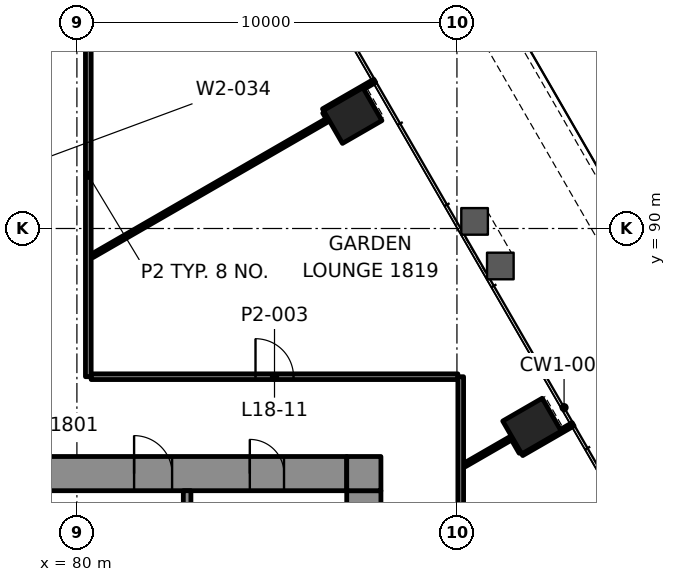
"""IFC4 building model, lengths in metres.
Left out: names, types, materials, properties, quantities, classifications, styles, units other than length and angle.
Written with IfcOpenShell. Run it as: python <this file> out.ifc"""

import sys

from ifc_helpers import new_model, si_unit, direction, frame, frame_2d, origin, origin_2d, place, context, subcontext, project, spatial, rectangle, extrude, element, fill, save


model = new_model("IFC4")
c1 = context("Model", 3, precision=1e-05, world=origin(), true_north=direction((0.0, 1.0)))
c2 = subcontext(c1, "Body", "Model", "MODEL_VIEW")
j1 = project(units=[si_unit("LENGTHUNIT", "METRE"), si_unit("PLANEANGLEUNIT", "RADIAN")], contexts=[c1])
p1 = place(None, origin())
s1 = spatial("IfcSite", under=j1, at=p1, CompositionType="ELEMENT")
p2 = place(p1, origin())
s2 = spatial("IfcBuilding", under=s1, at=p2, CompositionType="ELEMENT")
p3 = place(p2, frame((0.0, 0.0, 82.0)))
s3 = spatial("IfcBuildingStorey", under=s2, at=p3, CompositionType="ELEMENT", Elevation=82.0)
for number, where, z_axis, x_axis in (
    (1, (91.975, 84.8, -0.0), (0.0, 0.0, 1.0), (-0.5, 0.866, 0.0)),
    (2, (87.257, 92.972, -0.0), (0.0, 0.0, 1.0), (-0.5, 0.866, 0.0)),
):
    element("IfcColumn", number, at=place(p3, frame(where, z_axis=z_axis, x_axis=x_axis)), inside=s3, PredefinedType="COLUMN", context=c2, shape_type="SweptSolid", body=[
        extrude(rectangle(XDim=1.0, YDim=1.2, at=origin_2d()), origin(), (0.0, 0.0, 1.0), 4.2),
    ])
p4 = place(p3, frame((62.0, 83.55, 0.0), z_axis=(0.0, 0.0, 1.0), x_axis=(1.0, 0.0, 0.0)))
e3 = element("IfcWall", 3, at=p4, inside=s3, PredefinedType="SHEAR", context=c2, shape_type="SweptSolid", body=[
    extrude(rectangle(XDim=25.1, YDim=0.9, at=frame_2d((12.55, 0.0))), origin(), (0.0, 0.0, 1.0), 4.0),
])
p5 = place(p4, frame((5.695, 0.0, 0.0)))
e4 = element("IfcOpeningElement", 4, at=p5, cuts=e3, PredefinedType="OPENING", context=c2, shape_type="SweptSolid", body=[
    extrude(rectangle(XDim=1.0, YDim=2.1, at=frame_2d((0.5, 1.05))), frame((0.0, 0.46, 0.0), z_axis=(0.0, -1.0, 0.0), x_axis=(1.0, 0.0, 0.0)), (0.0, 0.0, 1.0), 0.92),
])
p6 = place(p4, frame((19.505, 0.0, 0.0)))
e5 = element("IfcOpeningElement", 5, at=p6, cuts=e3, PredefinedType="OPENING", context=c2, shape_type="SweptSolid", body=[
    extrude(rectangle(XDim=1.0, YDim=2.1, at=frame_2d((0.5, 1.05))), frame((0.0, 0.46, 0.0), z_axis=(0.0, -1.0, 0.0), x_axis=(1.0, 0.0, 0.0)), (0.0, 0.0, 1.0), 0.92),
])
p7 = place(p4, frame((3.45, 0.0, 0.0)))
e6 = element("IfcOpeningElement", 6, at=p7, cuts=e3, PredefinedType="OPENING", context=c2, shape_type="SweptSolid", body=[
    extrude(rectangle(XDim=0.9, YDim=2.1, at=frame_2d((0.45, 1.05))), frame((0.0, 0.46, 0.0), z_axis=(0.0, -1.0, 0.0), x_axis=(1.0, 0.0, 0.0)), (0.0, 0.0, 1.0), 0.92),
])
p8 = place(p4, frame((12.65, 0.0, 0.0)))
e7 = element("IfcOpeningElement", 7, at=p8, cuts=e3, PredefinedType="OPENING", context=c2, shape_type="SweptSolid", body=[
    extrude(rectangle(XDim=0.9, YDim=2.1, at=frame_2d((0.45, 1.05))), frame((0.0, 0.46, 0.0), z_axis=(0.0, -1.0, 0.0), x_axis=(1.0, 0.0, 0.0)), (0.0, 0.0, 1.0), 0.92),
])
p9 = place(p4, frame((22.55, 0.0, 0.0)))
e8 = element("IfcOpeningElement", 8, at=p9, cuts=e3, PredefinedType="OPENING", context=c2, shape_type="SweptSolid", body=[
    extrude(rectangle(XDim=0.9, YDim=2.1, at=frame_2d((0.45, 1.05))), frame((0.0, 0.46, 0.0), z_axis=(0.0, -1.0, 0.0), x_axis=(1.0, 0.0, 0.0)), (0.0, 0.0, 1.0), 0.92),
])
p10 = place(p3, frame((87.55, 66.9, 0.0), z_axis=(0.0, 0.0, 1.0), x_axis=(0.0, 1.0, 0.0)))
e9 = element("IfcWall", 9, at=p10, inside=s3, PredefinedType="SHEAR", context=c2, shape_type="SweptSolid", body=[
    extrude(rectangle(XDim=16.2, YDim=0.9, at=frame_2d((8.1, 0.0))), origin(), (0.0, 0.0, 1.0), 4.0),
])
p11 = place(p10, frame((5.5, 0.0, 0.0)))
e10 = element("IfcOpeningElement", 10, at=p11, cuts=e9, PredefinedType="OPENING", context=c2, shape_type="SweptSolid", body=[
    extrude(rectangle(XDim=1.8, YDim=2.1, at=frame_2d((0.9, 1.05))), frame((0.0, 0.46, 0.0), z_axis=(0.0, -1.0, 0.0), x_axis=(1.0, 0.0, 0.0)), (0.0, 0.0, 1.0), 0.92),
])
p12 = place(p10, frame((11.738, 0.0, 0.0)))
e11 = element("IfcOpeningElement", 11, at=p12, cuts=e9, PredefinedType="OPENING", context=c2, shape_type="SweptSolid", body=[
    extrude(rectangle(XDim=0.9, YDim=2.1, at=frame_2d((0.45, 1.05))), frame((0.0, 0.46, 0.0), z_axis=(0.0, -1.0, 0.0), x_axis=(1.0, 0.0, 0.0)), (0.0, 0.0, 1.0), 0.92),
])
p13 = place(p3, frame((87.1, 83.55, 0.0), z_axis=(0.0, 0.0, 1.0), x_axis=(1.0, 0.0, 0.0)))
e12 = element("IfcWall", 12, at=p13, inside=s3, PredefinedType="SHEAR", context=c2, shape_type="SweptSolid", body=[
    extrude(rectangle(XDim=0.9, YDim=0.9, at=frame_2d((0.45, 0.0))), origin(), (0.0, 0.0, 1.0), 4.0),
])
p14 = place(p3, frame((80.375, 86.1, 0.0), z_axis=(0.0, 0.0, 1.0), x_axis=(1.0, 0.0, 0.0)))
e13 = element("IfcWall", 13, at=p14, inside=s3, PredefinedType="PARTITIONING", context=c2, shape_type="SweptSolid", body=[
    extrude(rectangle(XDim=9.649, YDim=0.15, at=frame_2d((4.825, 0.0))), origin(), (0.0, 0.0, 1.0), 3.4),
])
p15 = place(p14, frame((4.325, 0.0, 0.0)))
e14 = element("IfcOpeningElement", 14, at=p15, cuts=e13, PredefinedType="OPENING", context=c2, shape_type="SweptSolid", body=[
    extrude(rectangle(XDim=1.0, YDim=2.1, at=frame_2d((0.5, 1.05))), frame((0.0, 0.085, 0.0), z_axis=(0.0, -1.0, 0.0), x_axis=(1.0, 0.0, 0.0)), (0.0, 0.0, 1.0), 0.17),
])
p16 = place(p3, frame((91.706, 84.068, 0.0), z_axis=(0.0, 0.0, 1.0), x_axis=(0.866018739521, 0.500011542666, 0.0)))
e15 = element("IfcWall", 15, at=p16, inside=s3, PredefinedType="PARTITIONING", context=c2, shape_type="SweptSolid", body=[
    extrude(rectangle(XDim=1.56, YDim=0.1, at=frame_2d((0.78, 0.0))), origin(), (0.0, 0.0, 1.0), 3.165),
])
p17 = place(p3, frame((90.201, 83.776, 0.0), z_axis=(0.0, 0.0, 1.0), x_axis=(0.866003030001, 0.500038750527, 0.0)))
e16 = element("IfcWall", 16, at=p17, inside=s3, PredefinedType="PARTITIONING", context=c2, shape_type="SweptSolid", body=[
    extrude(rectangle(XDim=1.448, YDim=0.1, at=frame_2d((0.724, 0.0))), origin(), (0.0, 0.0, 1.0), 3.4),
])
p18 = place(p3, frame((80.401, 89.28, 0.0), z_axis=(0.0, 0.0, 1.0), x_axis=(0.866017489163, 0.500013708276, 0.0)))
e17 = element("IfcWall", 17, at=p18, inside=s3, PredefinedType="PARTITIONING", context=c2, shape_type="SweptSolid", body=[
    extrude(rectangle(XDim=7.183, YDim=0.1, at=frame_2d((3.592, 0.0))), origin(), (0.0, 0.0, 1.0), 3.4),
])
p19 = place(p3, frame((86.488, 93.105, 0.0), z_axis=(0.0, 0.0, 1.0), x_axis=(0.866018739521, 0.500011542666, 0.0)))
e18 = element("IfcWall", 18, at=p19, inside=s3, PredefinedType="PARTITIONING", context=c2, shape_type="SweptSolid", body=[
    extrude(rectangle(XDim=1.56, YDim=0.1, at=frame_2d((0.78, 0.0))), origin(), (0.0, 0.0, 1.0), 3.165),
])
p20 = place(p3, frame((90.1, 86.1, 0.0), z_axis=(0.0, 0.0, 1.0), x_axis=(0.0, -1.0, 0.0)))
e19 = element("IfcWall", 19, at=p20, inside=s3, PredefinedType="PARTITIONING", context=c2, shape_type="SweptSolid", body=[
    extrude(rectangle(XDim=18.778, YDim=0.15, at=frame_2d((9.389, 0.0))), origin(), (0.0, 0.0, 1.0), 3.4),
])
p21 = place(p20, frame((7.462, 0.0, 0.0)))
e20 = element("IfcOpeningElement", 20, at=p21, cuts=e19, PredefinedType="OPENING", context=c2, shape_type="SweptSolid", body=[
    extrude(rectangle(XDim=1.0, YDim=2.1, at=frame_2d((0.5, 1.05))), frame((0.0, 0.085, 0.0), z_axis=(0.0, -1.0, 0.0), x_axis=(1.0, 0.0, 0.0)), (0.0, 0.0, 1.0), 0.17),
])
p22 = place(p20, frame((15.559, 0.0, 0.0)))
e21 = element("IfcOpeningElement", 21, at=p22, cuts=e19, PredefinedType="OPENING", context=c2, shape_type="SweptSolid", body=[
    extrude(rectangle(XDim=1.0, YDim=2.1, at=frame_2d((0.5, 1.05))), frame((0.0, 0.085, 0.0), z_axis=(0.0, -1.0, 0.0), x_axis=(1.0, 0.0, 0.0)), (0.0, 0.0, 1.0), 0.17),
])
p23 = place(p3, frame((80.3, 86.1, 0.0), z_axis=(0.0, 0.0, 1.0), x_axis=(0.0, 1.0, 0.0)))
e22 = element("IfcWall", 22, at=p23, inside=s3, PredefinedType="PARTITIONING", context=c2, shape_type="SweptSolid", body=[
    extrude(rectangle(XDim=10.599, YDim=0.15, at=frame_2d((5.3, 0.0))), origin(), (0.0, 0.0, 1.0), 3.322),
])
p24 = place(p3, frame((91.68, 84.111, 0.0), z_axis=(0.0, 0.0, 1.0), x_axis=(-0.50002266109, 0.866012320003, 0.0)))
e23 = element("IfcWall", 23, at=p24, inside=s3, PredefinedType="PARTITIONING", context=c2, shape_type="SweptSolid", body=[
    extrude(rectangle(XDim=0.399, YDim=0.1, at=frame_2d((0.199, 0.0))), origin(), (0.0, 0.0, 1.0), 3.4),
])
p25 = place(p3, frame((86.597, 92.915, 0.0), z_axis=(0.0, 0.0, 1.0), x_axis=(-0.500013496215, 0.866017611601, 0.0)))
e24 = element("IfcWall", 24, at=p25, inside=s3, PredefinedType="PARTITIONING", context=c2, shape_type="SweptSolid", body=[
    extrude(rectangle(XDim=0.169, YDim=0.1, at=frame_2d((0.085, 0.0))), origin(), (0.0, 0.0, 1.0), 3.4),
])
p26 = place(p3, frame((110.601, 61.239, 0.0), z_axis=(0.0, 0.0, 1.0), x_axis=(-0.499998492585, 0.866026274089, 0.0)))
e25 = element("IfcWall", 25, at=p26, inside=s3, PredefinedType="SOLIDWALL", context=c2, shape_type="SweptSolid", body=[
    extrude(rectangle(XDim=59.436, YDim=0.8, at=frame_2d((29.718, 0.0))), origin(), (0.0, 0.0, 1.0), 0.9),
])
p27 = place(p3, frame((82.9, 81.28, 0.0), z_axis=(0.0, 0.0, 1.0), x_axis=(0.0, 1.0, 0.0)))
e26 = element("IfcWall", 26, at=p27, inside=s3, PredefinedType="PARTITIONING", context=c2, shape_type="SweptSolid", body=[
    extrude(rectangle(XDim=1.82, YDim=0.2, at=frame_2d((0.91, 0.0))), origin(), (0.0, 0.0, 1.0), 4.0),
])
p28 = place(p15, origin())
e27 = element("IfcDoor", 27, at=p28, inside=s3, OperationType="SINGLE_SWING_RIGHT", PredefinedType="DOOR", context=c2, shape_type="SweptSolid", body=[
    extrude(rectangle(XDim=1.0, YDim=2.1, at=frame_2d((0.5, 1.05))), frame((0.0, 0.025, 0.0), z_axis=(0.0, -1.0, 0.0), x_axis=(1.0, 0.0, 0.0)), (0.0, 0.0, 1.0), 0.05),
])
fill(e14, e27)
p29 = place(p6, origin())
e28 = element("IfcDoor", 28, at=p29, inside=s3, OperationType="SINGLE_SWING_LEFT", PredefinedType="DOOR", context=c2, shape_type="SweptSolid", body=[
    extrude(rectangle(XDim=1.0, YDim=2.1, at=frame_2d((0.5, 1.05))), frame((0.0, 0.17, 0.0), z_axis=(0.0, -1.0, 0.0), x_axis=(1.0, 0.0, 0.0)), (0.0, 0.0, 1.0), 0.34),
])
fill(e5, e28)
p30 = place(p9, origin())
e29 = element("IfcDoor", 29, at=p30, inside=s3, OperationType="SINGLE_SWING_LEFT", PredefinedType="DOOR", context=c2, shape_type="SweptSolid", body=[
    extrude(rectangle(XDim=0.9, YDim=2.1, at=frame_2d((0.45, 1.05))), frame((0.0, 0.17, 0.0), z_axis=(0.0, -1.0, 0.0), x_axis=(1.0, 0.0, 0.0)), (0.0, 0.0, 1.0), 0.34),
])
fill(e8, e29)
save(model, sys.argv[1])
